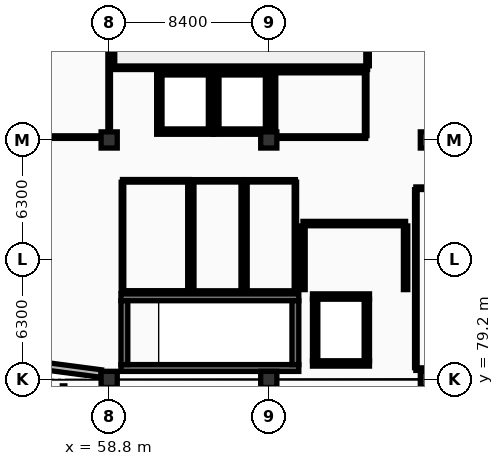
"""IFC4 building model, lengths in metres.
Left out: names, types, materials, properties, quantities, classifications, styles, units other than length and angle.
Written with IfcOpenShell. Run it as: python <this file> out.ifc"""

import sys

from ifc_helpers import new_model, si_unit, direction, frame, frame_2d, origin, origin_2d, place, context, subcontext, project, spatial, rectangle, extrude, element, fill, save


model = new_model("IFC4")
c1 = context("Model", 3, precision=1e-05, world=origin(), true_north=direction((0.0, 1.0)))
c2 = subcontext(c1, "Body", "Model", "MODEL_VIEW")
j1 = project(units=[si_unit("LENGTHUNIT", "METRE"), si_unit("PLANEANGLEUNIT", "RADIAN")], contexts=[c1])
p1 = place(None, origin())
s1 = spatial("IfcSite", under=j1, at=p1, CompositionType="ELEMENT")
p2 = place(p1, origin())
s2 = spatial("IfcBuilding", under=s1, at=p2, CompositionType="ELEMENT")
p3 = place(p2, frame((0.0, 0.0, 5.4)))
s3 = spatial("IfcBuildingStorey", under=s2, at=p3, CompositionType="ELEMENT", Elevation=5.4)
for number, where, z_axis, x_axis in (
    (1, (58.8, 79.2, 0.0), (0.0, 0.0, 1.0), (1.0, 0.0, 0.0)),
    (2, (58.8, 91.8, 0.0), (0.0, 0.0, 1.0), (1.0, 0.0, 0.0)),
    (3, (67.2, 79.2, 0.0), (0.0, 0.0, 1.0), (1.0, 0.0, 0.0)),
    (4, (67.2, 91.8, 0.0), (0.0, 0.0, 1.0), (1.0, 0.0, 0.0)),
    (5, (75.6, 79.2, 0.0), (0.0, 0.0, 1.0), (1.0, 0.0, 0.0)),
    (6, (75.6, 91.8, 0.0), (0.0, 0.0, 1.0), (1.0, 0.0, 0.0)),
):
    element("IfcColumn", number, at=place(p3, frame(where, z_axis=z_axis, x_axis=x_axis)), inside=s3, PredefinedType="COLUMN", context=c2, shape_type="SweptSolid", body=[
        extrude(rectangle(XDim=0.85, YDim=0.85, at=origin_2d()), origin(), (0.0, 0.0, 1.0), 4.5),
    ])
p4 = place(p3, frame((55.572, 79.877, 0.0), z_axis=(0.0, 0.0, 1.0), x_axis=(0.991443994311, -0.130532778046, 0.0)))
e7 = element("IfcWall", 7, at=p4, inside=s3, PredefinedType="ELEMENTEDWALL", context=c2, shape_type="SweptSolid", body=[
    extrude(rectangle(XDim=2.824, YDim=0.395, at=frame_2d((1.412, 0.0))), origin(), (0.0, 0.0, 1.0), 3.37),
])
for number, where, z_axis, x_axis in (
    (8, (59.42, 83.52, 0.0), (0.0, 0.0, 1.0), (1.0, 0.0, 0.0)),
    (9, (68.78, 79.8, 0.0), (0.0, 0.0, 1.0), (-1.0, 0.0, 0.0)),
):
    element("IfcWall", number, at=place(p3, frame(where, z_axis=z_axis, x_axis=x_axis)), inside=s3, PredefinedType="SHEAR", context=c2, shape_type="SweptSolid", body=[
        extrude(rectangle(XDim=9.36, YDim=0.36, at=frame_2d((4.68, 0.0))), origin(), (0.0, 0.0, 1.0), 4.24),
    ])
p5 = place(p3, frame((59.6, 79.98, 0.0), z_axis=(0.0, 0.0, 1.0), x_axis=(0.0, 1.0, 0.0)))
e10 = element("IfcWall", 10, at=p5, inside=s3, PredefinedType="SHEAR", context=c2, shape_type="SweptSolid", body=[
    extrude(rectangle(XDim=3.36, YDim=0.36, at=frame_2d((1.68, 0.0))), origin(), (0.0, 0.0, 1.0), 4.24),
])
p6 = place(p5, frame((1.08, 0.0, 0.0)))
e11 = element("IfcOpeningElement", 11, at=p6, cuts=e10, PredefinedType="OPENING", context=c2, shape_type="SweptSolid", body=[
    extrude(rectangle(XDim=1.2, YDim=2.2, at=frame_2d((0.6, 1.1))), frame((0.0, 0.19, 0.0), z_axis=(0.0, -1.0, 0.0), x_axis=(1.0, 0.0, 0.0)), (0.0, 0.0, 1.0), 0.38),
])
p7 = place(p3, frame((68.6, 83.34, 0.0), z_axis=(0.0, 0.0, 1.0), x_axis=(0.0, -1.0, 0.0)))
e12 = element("IfcWall", 12, at=p7, inside=s3, PredefinedType="SHEAR", context=c2, shape_type="SweptSolid", body=[
    extrude(rectangle(XDim=3.36, YDim=0.36, at=frame_2d((1.68, 0.0))), origin(), (0.0, 0.0, 1.0), 4.24),
])
p8 = place(p3, frame((69.5, 83.56, 0.0), z_axis=(0.0, 0.0, 1.0), x_axis=(1.0, 0.0, 0.0)))
e13 = element("IfcWall", 13, at=p8, inside=s3, PredefinedType="SHEAR", context=c2, shape_type="SweptSolid", body=[
    extrude(rectangle(XDim=3.0, YDim=0.28, at=frame_2d((1.5, 0.0))), origin(), (0.0, 0.0, 1.0), 4.24),
])
p9 = place(p8, frame((0.95, 0.0, 0.0)))
e14 = element("IfcOpeningElement", 14, at=p9, cuts=e13, PredefinedType="OPENING", context=c2, shape_type="SweptSolid", body=[
    extrude(rectangle(XDim=1.1, YDim=2.2, at=frame_2d((0.55, 1.1))), frame((0.0, 0.15, 0.0), z_axis=(0.0, -1.0, 0.0), x_axis=(1.0, 0.0, 0.0)), (0.0, 0.0, 1.0), 0.3),
])
p10 = place(p3, frame((72.5, 80.04, 0.0), z_axis=(0.0, 0.0, 1.0), x_axis=(-1.0, 0.0, 0.0)))
e15 = element("IfcWall", 15, at=p10, inside=s3, PredefinedType="SHEAR", context=c2, shape_type="SweptSolid", body=[
    extrude(rectangle(XDim=3.0, YDim=0.28, at=frame_2d((1.5, 0.0))), origin(), (0.0, 0.0, 1.0), 4.24),
])
for number, where, z_axis, x_axis in (
    (16, (69.64, 80.18, 0.0), (0.0, 0.0, 1.0), (0.0, 1.0, 0.0)),
    (17, (72.36, 83.42, 0.0), (0.0, 0.0, 1.0), (0.0, -1.0, 0.0)),
):
    element("IfcWall", number, at=place(p3, frame(where, z_axis=z_axis, x_axis=x_axis)), inside=s3, PredefinedType="SHEAR", context=c2, shape_type="SweptSolid", body=[
        extrude(rectangle(XDim=3.24, YDim=0.28, at=frame_2d((1.62, 0.0))), origin(), (0.0, 0.0, 1.0), 4.24),
    ])
p11 = place(p3, frame((61.3, 95.36, 0.0), z_axis=(0.0, 0.0, 1.0), x_axis=(1.0, 0.0, 0.0)))
e18 = element("IfcWall", 18, at=p11, inside=s3, PredefinedType="SHEAR", context=c2, shape_type="SweptSolid", body=[
    extrude(rectangle(XDim=3.0, YDim=0.28, at=frame_2d((1.5, 0.0))), origin(), (0.0, 0.0, 1.0), 4.24),
])
p12 = place(p3, frame((64.3, 92.24, 0.0), z_axis=(0.0, 0.0, 1.0), x_axis=(-1.0, 0.0, 0.0)))
e19 = element("IfcWall", 19, at=p12, inside=s3, PredefinedType="SHEAR", context=c2, shape_type="SweptSolid", body=[
    extrude(rectangle(XDim=3.0, YDim=0.28, at=frame_2d((1.5, 0.0))), origin(), (0.0, 0.0, 1.0), 4.24),
])
p13 = place(p12, frame((0.975, 0.0, 0.0)))
e20 = element("IfcOpeningElement", 20, at=p13, cuts=e19, PredefinedType="OPENING", context=c2, shape_type="SweptSolid", body=[
    extrude(rectangle(XDim=1.05, YDim=2.2, at=frame_2d((0.525, 1.1))), frame((0.0, 0.15, 0.0), z_axis=(0.0, -1.0, 0.0), x_axis=(1.0, 0.0, 0.0)), (0.0, 0.0, 1.0), 0.3),
])
for number, where, z_axis, x_axis in (
    (21, (61.44, 92.38, 0.0), (0.0, 0.0, 1.0), (0.0, 1.0, 0.0)),
    (22, (64.16, 95.22, 0.0), (0.0, 0.0, 1.0), (0.0, -1.0, 0.0)),
):
    element("IfcWall", number, at=place(p3, frame(where, z_axis=z_axis, x_axis=x_axis)), inside=s3, PredefinedType="SHEAR", context=c2, shape_type="SweptSolid", body=[
        extrude(rectangle(XDim=2.84, YDim=0.28, at=frame_2d((1.42, 0.0))), origin(), (0.0, 0.0, 1.0), 4.24),
    ])
p14 = place(p3, frame((64.3, 95.36, 0.0), z_axis=(0.0, 0.0, 1.0), x_axis=(1.0, 0.0, 0.0)))
e23 = element("IfcWall", 23, at=p14, inside=s3, PredefinedType="SHEAR", context=c2, shape_type="SweptSolid", body=[
    extrude(rectangle(XDim=3.0, YDim=0.28, at=frame_2d((1.5, 0.0))), origin(), (0.0, 0.0, 1.0), 4.24),
])
p15 = place(p3, frame((67.3, 92.24, 0.0), z_axis=(0.0, 0.0, 1.0), x_axis=(-1.0, 0.0, 0.0)))
e24 = element("IfcWall", 24, at=p15, inside=s3, PredefinedType="SHEAR", context=c2, shape_type="SweptSolid", body=[
    extrude(rectangle(XDim=3.0, YDim=0.28, at=frame_2d((1.5, 0.0))), origin(), (0.0, 0.0, 1.0), 4.24),
])
p16 = place(p15, frame((0.975, 0.0, 0.0)))
e25 = element("IfcOpeningElement", 25, at=p16, cuts=e24, PredefinedType="OPENING", context=c2, shape_type="SweptSolid", body=[
    extrude(rectangle(XDim=1.05, YDim=2.2, at=frame_2d((0.525, 1.1))), frame((0.0, 0.15, 0.0), z_axis=(0.0, -1.0, 0.0), x_axis=(1.0, 0.0, 0.0)), (0.0, 0.0, 1.0), 0.3),
])
for number, where, z_axis, x_axis in (
    (26, (64.44, 92.38, 0.0), (0.0, 0.0, 1.0), (0.0, 1.0, 0.0)),
    (27, (67.16, 95.22, 0.0), (0.0, 0.0, 1.0), (0.0, -1.0, 0.0)),
):
    element("IfcWall", number, at=place(p3, frame(where, z_axis=z_axis, x_axis=x_axis)), inside=s3, PredefinedType="SHEAR", context=c2, shape_type="SweptSolid", body=[
        extrude(rectangle(XDim=2.84, YDim=0.28, at=frame_2d((1.42, 0.0))), origin(), (0.0, 0.0, 1.0), 4.24),
    ])
p17 = place(p3, frame((69.0, 87.4, 0.0), z_axis=(0.0, 0.0, 1.0), x_axis=(1.0, 0.0, 0.0)))
e28 = element("IfcWall", 28, at=p17, inside=s3, PredefinedType="STANDARD", context=c2, shape_type="SweptSolid", body=[
    extrude(rectangle(XDim=5.4, YDim=0.23, at=frame_2d((2.7, 0.0))), origin(), (0.0, 0.0, 1.0), 4.225),
])
p18 = place(p17, frame((2.05, 0.0, 0.0)))
e29 = element("IfcOpeningElement", 29, at=p18, cuts=e28, PredefinedType="OPENING", context=c2, shape_type="SweptSolid", body=[
    extrude(rectangle(XDim=1.3, YDim=2.2, at=frame_2d((0.65, 1.1))), frame((0.0, 0.125, 0.0), z_axis=(0.0, -1.0, 0.0), x_axis=(1.0, 0.0, 0.0)), (0.0, 0.0, 1.0), 0.25),
])
for number, where, z_axis, x_axis in (
    (30, (69.0, 83.925, 0.0), (0.0, 0.0, 1.0), (0.0, 1.0, 0.0)),
    (31, (74.4, 87.275, 0.0), (0.0, 0.0, 1.0), (0.0, -1.0, 0.0)),
):
    element("IfcWall", number, at=place(p3, frame(where, z_axis=z_axis, x_axis=x_axis)), inside=s3, PredefinedType="STANDARD", context=c2, shape_type="SweptSolid", body=[
        extrude(rectangle(XDim=3.35, YDim=0.23, at=frame_2d((1.675, 0.0))), origin(), (0.0, 0.0, 1.0), 4.225),
    ])
p19 = place(p3, frame((63.2, 89.65, 0.0), z_axis=(0.0, 0.0, 1.0), x_axis=(1.0, 0.0, 0.0)))
e32 = element("IfcWall", 32, at=p19, inside=s3, PredefinedType="PARTITIONING", context=c2, shape_type="SweptSolid", body=[
    extrude(rectangle(XDim=2.6, YDim=0.125, at=frame_2d((1.3, 0.0))), origin(), (0.0, 0.0, 1.0), 4.225),
])
p20 = place(p19, frame((0.85, 0.0, 0.0)))
e33 = element("IfcOpeningElement", 33, at=p20, cuts=e32, PredefinedType="OPENING", context=c2, shape_type="SweptSolid", body=[
    extrude(rectangle(XDim=0.9, YDim=2.1, at=frame_2d((0.45, 1.05))), frame((0.0, 0.073, 0.0), z_axis=(0.0, -1.0, 0.0), x_axis=(1.0, 0.0, 0.0)), (0.0, 0.0, 1.0), 0.145),
])
p21 = place(p3, frame((65.8, 83.8, 0.0), z_axis=(0.0, 0.0, 1.0), x_axis=(-1.0, 0.0, 0.0)))
e34 = element("IfcWall", 34, at=p21, inside=s3, PredefinedType="PARTITIONING", context=c2, shape_type="SweptSolid", body=[
    extrude(rectangle(XDim=2.6, YDim=0.125, at=frame_2d((1.3, 0.0))), origin(), (0.0, 0.0, 1.0), 4.225),
])
for number, where, z_axis, x_axis in (
    (35, (63.2, 83.873, 0.0), (0.0, 0.0, 1.0), (0.0, 1.0, 0.0)),
    (36, (65.8, 89.577, 0.0), (0.0, 0.0, 1.0), (0.0, -1.0, 0.0)),
):
    element("IfcWall", number, at=place(p3, frame(where, z_axis=z_axis, x_axis=x_axis)), inside=s3, PredefinedType="PARTITIONING", context=c2, shape_type="SweptSolid", body=[
        extrude(rectangle(XDim=5.705, YDim=0.125, at=frame_2d((2.853, 0.0))), origin(), (0.0, 0.0, 1.0), 4.225),
    ])
p22 = place(p3, frame((66.0, 89.65, 0.0), z_axis=(0.0, 0.0, 1.0), x_axis=(1.0, 0.0, 0.0)))
e37 = element("IfcWall", 37, at=p22, inside=s3, PredefinedType="PARTITIONING", context=c2, shape_type="SweptSolid", body=[
    extrude(rectangle(XDim=2.6, YDim=0.125, at=frame_2d((1.3, 0.0))), origin(), (0.0, 0.0, 1.0), 3.37),
])
p23 = place(p22, frame((0.8, 0.0, 0.0)))
e38 = element("IfcOpeningElement", 38, at=p23, cuts=e37, PredefinedType="OPENING", context=c2, shape_type="SweptSolid", body=[
    extrude(rectangle(XDim=1.0, YDim=2.1, at=frame_2d((0.5, 1.05))), frame((0.0, 0.073, 0.0), z_axis=(0.0, -1.0, 0.0), x_axis=(1.0, 0.0, 0.0)), (0.0, 0.0, 1.0), 0.145),
])
p24 = place(p3, frame((68.6, 83.8, 0.0), z_axis=(0.0, 0.0, 1.0), x_axis=(-1.0, 0.0, 0.0)))
e39 = element("IfcWall", 39, at=p24, inside=s3, PredefinedType="PARTITIONING", context=c2, shape_type="SweptSolid", body=[
    extrude(rectangle(XDim=2.6, YDim=0.125, at=frame_2d((1.3, 0.0))), origin(), (0.0, 0.0, 1.0), 3.37),
])
for number, where, z_axis, x_axis in (
    (40, (66.0, 83.873, 0.0), (0.0, 0.0, 1.0), (0.0, 1.0, 0.0)),
    (41, (68.6, 89.577, 0.0), (0.0, 0.0, 1.0), (0.0, -1.0, 0.0)),
):
    element("IfcWall", number, at=place(p3, frame(where, z_axis=z_axis, x_axis=x_axis)), inside=s3, PredefinedType="PARTITIONING", context=c2, shape_type="SweptSolid", body=[
        extrude(rectangle(XDim=5.705, YDim=0.125, at=frame_2d((2.853, 0.0))), origin(), (0.0, 0.0, 1.0), 4.225),
    ])
p25 = place(p3, frame((59.5, 89.65, 0.0), z_axis=(0.0, 0.0, 1.0), x_axis=(1.0, 0.0, 0.0)))
e42 = element("IfcWall", 42, at=p25, inside=s3, PredefinedType="PARTITIONING", context=c2, shape_type="SweptSolid", body=[
    extrude(rectangle(XDim=3.5, YDim=0.135, at=frame_2d((1.75, 0.0))), origin(), (0.0, 0.0, 1.0), 4.225),
])
p26 = place(p25, frame((1.275, 0.0, 0.0)))
e43 = element("IfcOpeningElement", 43, at=p26, cuts=e42, PredefinedType="OPENING", context=c2, shape_type="SweptSolid", body=[
    extrude(rectangle(XDim=0.95, YDim=2.15, at=frame_2d((0.475, 1.075))), frame((0.0, 0.077, 0.0), z_axis=(0.0, -1.0, 0.0), x_axis=(1.0, 0.0, 0.0)), (0.0, 0.0, 1.0), 0.155),
])
p27 = place(p3, frame((63.0, 83.8, 0.0), z_axis=(0.0, 0.0, 1.0), x_axis=(-1.0, 0.0, 0.0)))
e44 = element("IfcWall", 44, at=p27, inside=s3, PredefinedType="PARTITIONING", context=c2, shape_type="SweptSolid", body=[
    extrude(rectangle(XDim=3.5, YDim=0.135, at=frame_2d((1.75, 0.0))), origin(), (0.0, 0.0, 1.0), 4.225),
])
for number, where, z_axis, x_axis in (
    (45, (59.5, 83.877, 0.0), (0.0, 0.0, 1.0), (0.0, 1.0, 0.0)),
    (46, (63.0, 89.573, 0.0), (0.0, 0.0, 1.0), (0.0, -1.0, 0.0)),
):
    element("IfcWall", number, at=place(p3, frame(where, z_axis=z_axis, x_axis=x_axis)), inside=s3, PredefinedType="PARTITIONING", context=c2, shape_type="SweptSolid", body=[
        extrude(rectangle(XDim=5.695, YDim=0.135, at=frame_2d((2.848, 0.0))), origin(), (0.0, 0.0, 1.0), 4.225),
    ])
p28 = place(p3, frame((56.4, 78.86, 0.0), z_axis=(0.0, 0.0, 1.0), x_axis=(0.0, -1.0, 0.0)))
e47 = element("IfcWall", 47, at=p28, inside=s3, PredefinedType="PARTITIONING", context=c2, shape_type="SweptSolid", body=[
    extrude(rectangle(XDim=7.983, YDim=0.135, at=frame_2d((3.991, 0.0))), origin(), (0.0, 0.0, 1.0), 3.33),
])
p29 = place(p3, frame((72.4, 95.6, 0.0), z_axis=(0.0, 0.0, 1.0), x_axis=(-1.0, 0.0, 0.0)))
e48 = element("IfcWall", 48, at=p29, inside=s3, PredefinedType="PARTITIONING", context=c2, shape_type="SweptSolid", body=[
    extrude(rectangle(XDim=13.4, YDim=0.185, at=frame_2d((6.7, 0.0))), origin(), (0.0, 0.0, 1.0), 3.37),
])
p30 = place(p3, frame((59.0, 95.702, 0.0), z_axis=(0.0, 0.0, 1.0), x_axis=(0.0, 1.0, 0.0)))
e49 = element("IfcWall", 49, at=p30, inside=s3, PredefinedType="PARTITIONING", context=c2, shape_type="SweptSolid", body=[
    extrude(rectangle(XDim=7.795, YDim=0.185, at=frame_2d((3.897, 0.0))), origin(), (0.0, 0.0, 1.0), 3.37),
])
p31 = place(p3, frame((72.4, 103.498, 0.0), z_axis=(0.0, 0.0, 1.0), x_axis=(0.0, -1.0, 0.0)))
e50 = element("IfcWall", 50, at=p31, inside=s3, PredefinedType="PARTITIONING", context=c2, shape_type="SweptSolid", body=[
    extrude(rectangle(XDim=7.795, YDim=0.185, at=frame_2d((3.897, 0.0))), origin(), (0.0, 0.0, 1.0), 3.62),
])
p32 = place(p31, frame((2.133, 0.0, 0.0)))
e51 = element("IfcOpeningElement", 51, at=p32, cuts=e50, PredefinedType="OPENING", context=c2, shape_type="SweptSolid", body=[
    extrude(rectangle(XDim=2.0, YDim=2.5, at=frame_2d((1.0, 1.25))), frame((0.0, 0.103, 0.0), z_axis=(0.0, -1.0, 0.0), x_axis=(1.0, 0.0, 0.0)), (0.0, 0.0, 1.0), 0.205),
])
p33 = place(p3, frame((67.5, 95.4, 0.0), z_axis=(0.0, 0.0, 1.0), x_axis=(1.0, 0.0, 0.0)))
e52 = element("IfcWall", 52, at=p33, inside=s3, PredefinedType="PARTITIONING", context=c2, shape_type="SweptSolid", body=[
    extrude(rectangle(XDim=4.8, YDim=0.135, at=frame_2d((2.4, 0.0))), origin(), (0.0, 0.0, 1.0), 3.37),
])
p34 = place(p3, frame((72.3, 91.95, 0.0), z_axis=(0.0, 0.0, 1.0), x_axis=(-1.0, 0.0, 0.0)))
e53 = element("IfcWall", 53, at=p34, inside=s3, PredefinedType="PARTITIONING", context=c2, shape_type="SweptSolid", body=[
    extrude(rectangle(XDim=4.8, YDim=0.135, at=frame_2d((2.4, 0.0))), origin(), (0.0, 0.0, 1.0), 3.37),
])
p35 = place(p34, frame((1.61, 0.0, 0.0)))
e54 = element("IfcOpeningElement", 54, at=p35, cuts=e53, PredefinedType="OPENING", context=c2, shape_type="SweptSolid", body=[
    extrude(rectangle(XDim=0.95, YDim=2.15, at=frame_2d((0.475, 1.075))), frame((0.0, 0.077, 0.0), z_axis=(0.0, -1.0, 0.0), x_axis=(1.0, 0.0, 0.0)), (0.0, 0.0, 1.0), 0.155),
])
p36 = place(p3, frame((67.5, 92.028, 0.0), z_axis=(0.0, 0.0, 1.0), x_axis=(0.0, 1.0, 0.0)))
e55 = element("IfcWall", 55, at=p36, inside=s3, PredefinedType="PARTITIONING", context=c2, shape_type="SweptSolid", body=[
    extrude(rectangle(XDim=3.295, YDim=0.135, at=frame_2d((1.647, 0.0))), origin(), (0.0, 0.0, 1.0), 3.37),
])
p37 = place(p3, frame((72.3, 95.323, 0.0), z_axis=(0.0, 0.0, 1.0), x_axis=(0.0, -1.0, 0.0)))
e56 = element("IfcWall", 56, at=p37, inside=s3, PredefinedType="PARTITIONING", context=c2, shape_type="SweptSolid", body=[
    extrude(rectangle(XDim=3.295, YDim=0.135, at=frame_2d((1.647, 0.0))), origin(), (0.0, 0.0, 1.0), 3.57),
])
p38 = place(p3, frame((74.94, 89.26, 0.0), z_axis=(0.0, 0.0, 1.0), x_axis=(1.0, 0.0, 0.0)))
e57 = element("IfcWall", 57, at=p38, inside=s3, PredefinedType="PARTITIONING", context=c2, shape_type="SweptSolid", body=[
    extrude(rectangle(XDim=4.958, YDim=0.135, at=frame_2d((2.479, 0.0))), origin(), (0.0, 0.0, 1.0), 3.37),
])
p39 = place(p38, frame((2.131, 0.0, 0.0)))
e58 = element("IfcOpeningElement", 58, at=p39, cuts=e57, PredefinedType="OPENING", context=c2, shape_type="SweptSolid", body=[
    extrude(rectangle(XDim=1.02, YDim=2.15, at=frame_2d((0.51, 1.075))), frame((0.0, 0.077, 0.0), z_axis=(0.0, -1.0, 0.0), x_axis=(1.0, 0.0, 0.0)), (0.0, 0.0, 1.0), 0.155),
])
p40 = place(p3, frame((79.898, 79.74, 0.0), z_axis=(0.0, 0.0, 1.0), x_axis=(-1.0, 0.0, 0.0)))
e59 = element("IfcWall", 59, at=p40, inside=s3, PredefinedType="PARTITIONING", context=c2, shape_type="SweptSolid", body=[
    extrude(rectangle(XDim=4.958, YDim=0.135, at=frame_2d((2.479, 0.0))), origin(), (0.0, 0.0, 1.0), 3.37),
])
p41 = place(p3, frame((74.94, 79.817, 0.0), z_axis=(0.0, 0.0, 1.0), x_axis=(0.0, 1.0, 0.0)))
e60 = element("IfcWall", 60, at=p41, inside=s3, PredefinedType="PARTITIONING", context=c2, shape_type="SweptSolid", body=[
    extrude(rectangle(XDim=9.365, YDim=0.135, at=frame_2d((4.683, 0.0))), origin(), (0.0, 0.0, 1.0), 4.225),
])
p42 = place(p3, frame((58.8, 91.95, 0.0), z_axis=(0.0, 0.0, 1.0), x_axis=(-1.0, 0.0, 0.0)))
e61 = element("IfcWall", 61, at=p42, inside=s3, PredefinedType="PARTITIONING", context=c2, shape_type="SweptSolid", body=[
    extrude(rectangle(XDim=9.5, YDim=0.135, at=frame_2d((4.75, 0.0))), origin(), (0.0, 0.0, 1.0), 3.27),
])
p43 = place(p42, frame((3.073, 0.0, 0.0)))
e62 = element("IfcOpeningElement", 62, at=p43, cuts=e61, PredefinedType="OPENING", context=c2, shape_type="SweptSolid", body=[
    extrude(rectangle(XDim=1.02, YDim=2.15, at=frame_2d((0.51, 1.075))), frame((0.0, 0.077, 0.0), z_axis=(0.0, -1.0, 0.0), x_axis=(1.0, 0.0, 0.0)), (0.0, 0.0, 1.0), 0.155),
])
p44 = place(p3, frame((58.8, 99.423, 0.0), z_axis=(0.0, 0.0, 1.0), x_axis=(0.0, -1.0, 0.0)))
e63 = element("IfcWall", 63, at=p44, inside=s3, PredefinedType="PARTITIONING", context=c2, shape_type="SweptSolid", body=[
    extrude(rectangle(XDim=7.395, YDim=0.135, at=frame_2d((3.698, 0.0))), origin(), (0.0, 0.0, 1.0), 3.37),
])
p45 = place(p6, origin())
e64 = element("IfcDoor", 64, at=p45, inside=s3, OperationType="SINGLE_SWING_RIGHT", PredefinedType="DOOR", context=c2, shape_type="SweptSolid", body=[
    extrude(rectangle(XDim=1.2, YDim=2.2, at=frame_2d((0.6, 1.1))), frame((0.0, 0.025, 0.0), z_axis=(0.0, -1.0, 0.0), x_axis=(1.0, 0.0, 0.0)), (0.0, 0.0, 1.0), 0.05),
])
fill(e11, e64)
p46 = place(p9, origin())
e65 = element("IfcDoor", 65, at=p46, inside=s3, OperationType="DOUBLE_DOOR_SLIDING", PredefinedType="DOOR", context=c2, shape_type="SweptSolid", body=[
    extrude(rectangle(XDim=1.1, YDim=2.2, at=frame_2d((0.55, 1.1))), frame((0.0, 0.025, 0.0), z_axis=(0.0, -1.0, 0.0), x_axis=(1.0, 0.0, 0.0)), (0.0, 0.0, 1.0), 0.05),
])
fill(e14, e65)
p47 = place(p13, origin())
e66 = element("IfcDoor", 66, at=p47, inside=s3, OperationType="DOUBLE_DOOR_SLIDING", PredefinedType="DOOR", context=c2, shape_type="SweptSolid", body=[
    extrude(rectangle(XDim=1.05, YDim=2.2, at=frame_2d((0.525, 1.1))), frame((0.0, 0.025, 0.0), z_axis=(0.0, -1.0, 0.0), x_axis=(1.0, 0.0, 0.0)), (0.0, 0.0, 1.0), 0.05),
])
fill(e20, e66)
p48 = place(p16, origin())
e67 = element("IfcDoor", 67, at=p48, inside=s3, OperationType="DOUBLE_DOOR_SLIDING", PredefinedType="DOOR", context=c2, shape_type="SweptSolid", body=[
    extrude(rectangle(XDim=1.05, YDim=2.2, at=frame_2d((0.525, 1.1))), frame((0.0, 0.025, 0.0), z_axis=(0.0, -1.0, 0.0), x_axis=(1.0, 0.0, 0.0)), (0.0, 0.0, 1.0), 0.05),
])
fill(e25, e67)
p49 = place(p18, origin())
e68 = element("IfcDoor", 68, at=p49, inside=s3, OperationType="SINGLE_SWING_LEFT", PredefinedType="DOOR", context=c2, shape_type="SweptSolid", body=[
    extrude(rectangle(XDim=1.3, YDim=2.2, at=frame_2d((0.65, 1.1))), frame((0.0, 0.025, 0.0), z_axis=(0.0, -1.0, 0.0), x_axis=(1.0, 0.0, 0.0)), (0.0, 0.0, 1.0), 0.05),
])
fill(e29, e68)
p50 = place(p20, origin())
e69 = element("IfcDoor", 69, at=p50, inside=s3, OperationType="SINGLE_SWING_LEFT", PredefinedType="DOOR", context=c2, shape_type="SweptSolid", body=[
    extrude(rectangle(XDim=0.9, YDim=2.1, at=frame_2d((0.45, 1.05))), frame((0.0, 0.025, 0.0), z_axis=(0.0, -1.0, 0.0), x_axis=(1.0, 0.0, 0.0)), (0.0, 0.0, 1.0), 0.05),
])
fill(e33, e69)
p51 = place(p23, origin())
e70 = element("IfcDoor", 70, at=p51, inside=s3, OperationType="SINGLE_SWING_RIGHT", PredefinedType="DOOR", context=c2, shape_type="SweptSolid", body=[
    extrude(rectangle(XDim=1.0, YDim=2.1, at=frame_2d((0.5, 1.05))), frame((0.0, 0.025, 0.0), z_axis=(0.0, -1.0, 0.0), x_axis=(1.0, 0.0, 0.0)), (0.0, 0.0, 1.0), 0.05),
])
fill(e38, e70)
p52 = place(p26, origin())
e71 = element("IfcDoor", 71, at=p52, inside=s3, OperationType="SINGLE_SWING_LEFT", PredefinedType="DOOR", context=c2, shape_type="SweptSolid", body=[
    extrude(rectangle(XDim=0.95, YDim=2.15, at=frame_2d((0.475, 1.075))), frame((0.0, 0.025, 0.0), z_axis=(0.0, -1.0, 0.0), x_axis=(1.0, 0.0, 0.0)), (0.0, 0.0, 1.0), 0.05),
])
fill(e43, e71)
p53 = place(p35, origin())
e72 = element("IfcDoor", 72, at=p53, inside=s3, OperationType="SINGLE_SWING_RIGHT", PredefinedType="DOOR", context=c2, shape_type="SweptSolid", body=[
    extrude(rectangle(XDim=0.95, YDim=2.15, at=frame_2d((0.475, 1.075))), frame((0.0, 0.025, 0.0), z_axis=(0.0, -1.0, 0.0), x_axis=(1.0, 0.0, 0.0)), (0.0, 0.0, 1.0), 0.05),
])
fill(e54, e72)
save(model, sys.argv[1])
